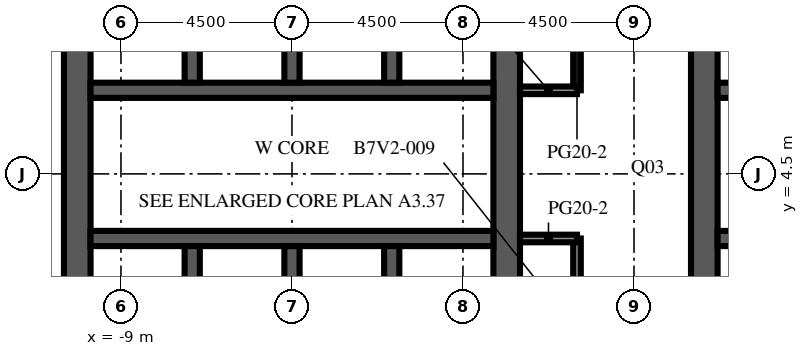
"""IFC4 building model, lengths in metres.
Left out: names, types, materials, properties, quantities, classifications, styles, units other than length and angle.
Written with IfcOpenShell. Run it as: python <this file> out.ifc"""

import sys

from ifc_helpers import new_model, si_unit, direction, frame, frame_2d, origin, place, context, subcontext, project, spatial, rectangle, extrude, element, fill, save


model = new_model("IFC4")
c1 = context("Model", 3, precision=1e-05, world=origin(), true_north=direction((0.0, 1.0)))
c2 = subcontext(c1, "Body", "Model", "MODEL_VIEW")
j1 = project(units=[si_unit("LENGTHUNIT", "METRE"), si_unit("PLANEANGLEUNIT", "RADIAN")], contexts=[c1])
p1 = place(None, origin())
s1 = spatial("IfcSite", under=j1, at=p1, CompositionType="ELEMENT")
p2 = place(p1, origin())
s2 = spatial("IfcBuilding", under=s1, at=p2, CompositionType="ELEMENT")
p3 = place(p2, frame((0.0, 0.0, 256.2)))
s3 = spatial("IfcBuildingStorey", under=s2, at=p3, CompositionType="ELEMENT", Elevation=256.2)
p4 = place(p3, frame((-10.15, -9.0, 0.0), z_axis=(0.0, 0.0, 1.0), x_axis=(0.0, 1.0, 0.0)))
e1 = element("IfcWall", 1, at=p4, inside=s3, PredefinedType="SHEAR", context=c2, shape_type="SweptSolid", body=[
    extrude(rectangle(XDim=27.5, YDim=0.7, at=frame_2d((13.75, 0.0))), origin(), (0.0, 0.0, 1.0), 4.1),
])
p5 = place(p4, frame((12.55, 0.0, 0.0)))
e2 = element("IfcOpeningElement", 2, at=p5, cuts=e1, PredefinedType="OPENING", context=c2, shape_type="SweptSolid", body=[
    extrude(rectangle(XDim=2.4, YDim=2.4, at=frame_2d((1.2, 1.2))), frame((0.0, 0.36, 0.0), z_axis=(0.0, -1.0, 0.0), x_axis=(1.0, 0.0, 0.0)), (0.0, 0.0, 1.0), 0.72),
])
p6 = place(p4, frame((6.825, 0.0, 0.0)))
e3 = element("IfcOpeningElement", 3, at=p6, cuts=e1, PredefinedType="OPENING", context=c2, shape_type="SweptSolid", body=[
    extrude(rectangle(XDim=1.2, YDim=2.1, at=frame_2d((0.6, 1.05))), frame((0.0, 0.36, 0.0), z_axis=(0.0, -1.0, 0.0), x_axis=(1.0, 0.0, 0.0)), (0.0, 0.0, 1.0), 0.72),
])
p7 = place(p4, frame((19.475, 0.0, 0.0)))
e4 = element("IfcOpeningElement", 4, at=p7, cuts=e1, PredefinedType="OPENING", context=c2, shape_type="SweptSolid", body=[
    extrude(rectangle(XDim=1.2, YDim=2.1, at=frame_2d((0.6, 1.05))), frame((0.0, 0.36, 0.0), z_axis=(0.0, -1.0, 0.0), x_axis=(1.0, 0.0, 0.0)), (0.0, 0.0, 1.0), 0.72),
])
p8 = place(p3, frame((1.15, -9.0, 0.0), z_axis=(0.0, 0.0, 1.0), x_axis=(0.0, 1.0, 0.0)))
e5 = element("IfcWall", 5, at=p8, inside=s3, PredefinedType="SHEAR", context=c2, shape_type="SweptSolid", body=[
    extrude(rectangle(XDim=27.5, YDim=0.7, at=frame_2d((13.75, 0.0))), origin(), (0.0, 0.0, 1.0), 4.1),
])
p9 = place(p8, frame((12.55, 0.0, 0.0)))
e6 = element("IfcOpeningElement", 6, at=p9, cuts=e5, PredefinedType="OPENING", context=c2, shape_type="SweptSolid", body=[
    extrude(rectangle(XDim=2.4, YDim=2.4, at=frame_2d((1.2, 1.2))), frame((0.0, 0.36, 0.0), z_axis=(0.0, -1.0, 0.0), x_axis=(1.0, 0.0, 0.0)), (0.0, 0.0, 1.0), 0.72),
])
p10 = place(p8, frame((3.788, 0.0, 0.0)))
e7 = element("IfcOpeningElement", 7, at=p10, cuts=e5, PredefinedType="OPENING", context=c2, shape_type="SweptSolid", body=[
    extrude(rectangle(XDim=0.968, YDim=2.1, at=frame_2d((0.484, 1.05))), frame((0.0, 0.36, 0.0), z_axis=(0.0, -1.0, 0.0), x_axis=(1.0, 0.0, 0.0)), (0.0, 0.0, 1.0), 0.72),
])
p11 = place(p8, frame((23.54, 0.0, 0.0)))
e8 = element("IfcOpeningElement", 8, at=p11, cuts=e5, PredefinedType="OPENING", context=c2, shape_type="SweptSolid", body=[
    extrude(rectangle(XDim=1.2, YDim=2.1, at=frame_2d((0.6, 1.05))), frame((0.0, 0.36, 0.0), z_axis=(0.0, -1.0, 0.0), x_axis=(1.0, 0.0, 0.0)), (0.0, 0.0, 1.0), 0.72),
])
p12 = place(p3, frame((-9.8, 2.8, 0.0), z_axis=(0.0, 0.0, 1.0), x_axis=(1.0, 0.0, 0.0)))
e9 = element("IfcWall", 9, at=p12, inside=s3, PredefinedType="SHEAR", context=c2, shape_type="SweptSolid", body=[
    extrude(rectangle(XDim=10.6, YDim=0.4, at=frame_2d((5.3, 0.0))), origin(), (0.0, 0.0, 1.0), 4.1),
])
p13 = place(p12, frame((0.688, 0.0, 0.0)))
e10 = element("IfcOpeningElement", 10, at=p13, cuts=e9, PredefinedType="OPENING", context=c2, shape_type="SweptSolid", body=[
    extrude(rectangle(XDim=1.1, YDim=2.1, at=frame_2d((0.55, 1.05))), frame((0.0, 0.21, 0.0), z_axis=(0.0, -1.0, 0.0), x_axis=(1.0, 0.0, 0.0)), (0.0, 0.0, 1.0), 0.42),
])
p14 = place(p12, frame((3.438, 0.0, 0.0)))
e11 = element("IfcOpeningElement", 11, at=p14, cuts=e9, PredefinedType="OPENING", context=c2, shape_type="SweptSolid", body=[
    extrude(rectangle(XDim=1.1, YDim=2.1, at=frame_2d((0.55, 1.05))), frame((0.0, 0.21, 0.0), z_axis=(0.0, -1.0, 0.0), x_axis=(1.0, 0.0, 0.0)), (0.0, 0.0, 1.0), 0.42),
])
p15 = place(p12, frame((6.113, 0.0, 0.0)))
e12 = element("IfcOpeningElement", 12, at=p15, cuts=e9, PredefinedType="OPENING", context=c2, shape_type="SweptSolid", body=[
    extrude(rectangle(XDim=1.0, YDim=2.1, at=frame_2d((0.5, 1.05))), frame((0.0, 0.21, 0.0), z_axis=(0.0, -1.0, 0.0), x_axis=(1.0, 0.0, 0.0)), (0.0, 0.0, 1.0), 0.42),
])
p16 = place(p12, frame((8.863, 0.0, 0.0)))
e13 = element("IfcOpeningElement", 13, at=p16, cuts=e9, PredefinedType="OPENING", context=c2, shape_type="SweptSolid", body=[
    extrude(rectangle(XDim=1.0, YDim=2.1, at=frame_2d((0.5, 1.05))), frame((0.0, 0.21, 0.0), z_axis=(0.0, -1.0, 0.0), x_axis=(1.0, 0.0, 0.0)), (0.0, 0.0, 1.0), 0.42),
])
p17 = place(p3, frame((-9.8, 6.7, 0.0), z_axis=(0.0, 0.0, 1.0), x_axis=(1.0, 0.0, 0.0)))
e14 = element("IfcWall", 14, at=p17, inside=s3, PredefinedType="SHEAR", context=c2, shape_type="SweptSolid", body=[
    extrude(rectangle(XDim=10.6, YDim=0.4, at=frame_2d((5.3, 0.0))), origin(), (0.0, 0.0, 1.0), 4.1),
])
p18 = place(p17, frame((3.438, 0.0, 0.0)))
e15 = element("IfcOpeningElement", 15, at=p18, cuts=e14, PredefinedType="OPENING", context=c2, shape_type="SweptSolid", body=[
    extrude(rectangle(XDim=1.1, YDim=2.1, at=frame_2d((0.55, 1.05))), frame((0.0, 0.21, 0.0), z_axis=(0.0, -1.0, 0.0), x_axis=(1.0, 0.0, 0.0)), (0.0, 0.0, 1.0), 0.42),
])
p19 = place(p17, frame((6.062, 0.0, 0.0)))
e16 = element("IfcOpeningElement", 16, at=p19, cuts=e14, PredefinedType="OPENING", context=c2, shape_type="SweptSolid", body=[
    extrude(rectangle(XDim=1.1, YDim=2.1, at=frame_2d((0.55, 1.05))), frame((0.0, 0.21, 0.0), z_axis=(0.0, -1.0, 0.0), x_axis=(1.0, 0.0, 0.0)), (0.0, 0.0, 1.0), 0.42),
])
p20 = place(p17, frame((8.812, 0.0, 0.0)))
e17 = element("IfcOpeningElement", 17, at=p20, cuts=e14, PredefinedType="OPENING", context=c2, shape_type="SweptSolid", body=[
    extrude(rectangle(XDim=1.1, YDim=2.1, at=frame_2d((0.55, 1.05))), frame((0.0, 0.21, 0.0), z_axis=(0.0, -1.0, 0.0), x_axis=(1.0, 0.0, 0.0)), (0.0, 0.0, 1.0), 0.42),
])
p21 = place(p17, frame((0.738, 0.0, 0.0)))
e18 = element("IfcOpeningElement", 18, at=p21, cuts=e14, PredefinedType="OPENING", context=c2, shape_type="SweptSolid", body=[
    extrude(rectangle(XDim=1.0, YDim=2.1, at=frame_2d((0.5, 1.05))), frame((0.0, 0.21, 0.0), z_axis=(0.0, -1.0, 0.0), x_axis=(1.0, 0.0, 0.0)), (0.0, 0.0, 1.0), 0.42),
])
for number, where, z_axis, x_axis in (
    (19, (-7.125, -0.3, 0.0), (0.0, 0.0, 1.0), (0.0, 1.0, 0.0)),
    (20, (-7.125, 6.9, 0.0), (0.0, 0.0, 1.0), (0.0, 1.0, 0.0)),
    (21, (-4.5, -0.3, 0.0), (0.0, 0.0, 1.0), (0.0, 1.0, 0.0)),
    (22, (-4.5, 6.9, 0.0), (0.0, 0.0, 1.0), (0.0, 1.0, 0.0)),
    (23, (-1.875, -0.3, 0.0), (0.0, 0.0, 1.0), (0.0, 1.0, 0.0)),
    (24, (-1.875, 6.9, 0.0), (0.0, 0.0, 1.0), (0.0, 1.0, 0.0)),
):
    element("IfcWall", number, at=place(p3, frame(where, z_axis=z_axis, x_axis=x_axis)), inside=s3, PredefinedType="SHEAR", context=c2, shape_type="SweptSolid", body=[
        extrude(rectangle(XDim=2.9, YDim=0.4, at=frame_2d((1.45, 0.0))), origin(), (0.0, 0.0, 1.0), 4.1),
    ])
p22 = place(p3, frame((6.35, -9.0, 0.0), z_axis=(0.0, 0.0, 1.0), x_axis=(0.0, 1.0, 0.0)))
e25 = element("IfcWall", 25, at=p22, inside=s3, PredefinedType="SHEAR", context=c2, shape_type="SweptSolid", body=[
    extrude(rectangle(XDim=27.5, YDim=0.7, at=frame_2d((13.75, 0.0))), origin(), (0.0, 0.0, 1.0), 4.1),
])
p23 = place(p22, frame((12.55, 0.0, 0.0)))
e26 = element("IfcOpeningElement", 26, at=p23, cuts=e25, PredefinedType="OPENING", context=c2, shape_type="SweptSolid", body=[
    extrude(rectangle(XDim=2.4, YDim=2.4, at=frame_2d((1.2, 1.2))), frame((0.0, 0.36, 0.0), z_axis=(0.0, -1.0, 0.0), x_axis=(1.0, 0.0, 0.0)), (0.0, 0.0, 1.0), 0.72),
])
p24 = place(p22, frame((3.788, 0.0, 0.0)))
e27 = element("IfcOpeningElement", 27, at=p24, cuts=e25, PredefinedType="OPENING", context=c2, shape_type="SweptSolid", body=[
    extrude(rectangle(XDim=0.968, YDim=2.1, at=frame_2d((0.484, 1.05))), frame((0.0, 0.36, 0.0), z_axis=(0.0, -1.0, 0.0), x_axis=(1.0, 0.0, 0.0)), (0.0, 0.0, 1.0), 0.72),
])
p25 = place(p22, frame((23.54, 0.0, 0.0)))
e28 = element("IfcOpeningElement", 28, at=p25, cuts=e25, PredefinedType="OPENING", context=c2, shape_type="SweptSolid", body=[
    extrude(rectangle(XDim=1.2, YDim=2.1, at=frame_2d((0.6, 1.05))), frame((0.0, 0.36, 0.0), z_axis=(0.0, -1.0, 0.0), x_axis=(1.0, 0.0, 0.0)), (0.0, 0.0, 1.0), 0.72),
])
p26 = place(p3, frame((6.7, 2.8, 0.0), z_axis=(0.0, 0.0, 1.0), x_axis=(1.0, 0.0, 0.0)))
e29 = element("IfcWall", 29, at=p26, inside=s3, PredefinedType="SHEAR", context=c2, shape_type="SweptSolid", body=[
    extrude(rectangle(XDim=10.6, YDim=0.4, at=frame_2d((5.3, 0.0))), origin(), (0.0, 0.0, 1.0), 4.1),
])
p27 = place(p26, frame((0.688, 0.0, 0.0)))
e30 = element("IfcOpeningElement", 30, at=p27, cuts=e29, PredefinedType="OPENING", context=c2, shape_type="SweptSolid", body=[
    extrude(rectangle(XDim=1.1, YDim=2.1, at=frame_2d((0.55, 1.05))), frame((0.0, 0.21, 0.0), z_axis=(0.0, -1.0, 0.0), x_axis=(1.0, 0.0, 0.0)), (0.0, 0.0, 1.0), 0.42),
])
p28 = place(p26, frame((3.438, 0.0, 0.0)))
e31 = element("IfcOpeningElement", 31, at=p28, cuts=e29, PredefinedType="OPENING", context=c2, shape_type="SweptSolid", body=[
    extrude(rectangle(XDim=1.1, YDim=2.1, at=frame_2d((0.55, 1.05))), frame((0.0, 0.21, 0.0), z_axis=(0.0, -1.0, 0.0), x_axis=(1.0, 0.0, 0.0)), (0.0, 0.0, 1.0), 0.42),
])
p29 = place(p26, frame((6.113, 0.0, 0.0)))
e32 = element("IfcOpeningElement", 32, at=p29, cuts=e29, PredefinedType="OPENING", context=c2, shape_type="SweptSolid", body=[
    extrude(rectangle(XDim=1.0, YDim=2.1, at=frame_2d((0.5, 1.05))), frame((0.0, 0.21, 0.0), z_axis=(0.0, -1.0, 0.0), x_axis=(1.0, 0.0, 0.0)), (0.0, 0.0, 1.0), 0.42),
])
p30 = place(p26, frame((8.863, 0.0, 0.0)))
e33 = element("IfcOpeningElement", 33, at=p30, cuts=e29, PredefinedType="OPENING", context=c2, shape_type="SweptSolid", body=[
    extrude(rectangle(XDim=1.0, YDim=2.1, at=frame_2d((0.5, 1.05))), frame((0.0, 0.21, 0.0), z_axis=(0.0, -1.0, 0.0), x_axis=(1.0, 0.0, 0.0)), (0.0, 0.0, 1.0), 0.42),
])
p31 = place(p3, frame((6.7, 6.7, 0.0), z_axis=(0.0, 0.0, 1.0), x_axis=(1.0, 0.0, 0.0)))
e34 = element("IfcWall", 34, at=p31, inside=s3, PredefinedType="SHEAR", context=c2, shape_type="SweptSolid", body=[
    extrude(rectangle(XDim=10.6, YDim=0.4, at=frame_2d((5.3, 0.0))), origin(), (0.0, 0.0, 1.0), 4.1),
])
p32 = place(p31, frame((3.438, 0.0, 0.0)))
e35 = element("IfcOpeningElement", 35, at=p32, cuts=e34, PredefinedType="OPENING", context=c2, shape_type="SweptSolid", body=[
    extrude(rectangle(XDim=1.1, YDim=2.1, at=frame_2d((0.55, 1.05))), frame((0.0, 0.21, 0.0), z_axis=(0.0, -1.0, 0.0), x_axis=(1.0, 0.0, 0.0)), (0.0, 0.0, 1.0), 0.42),
])
p33 = place(p31, frame((6.062, 0.0, 0.0)))
e36 = element("IfcOpeningElement", 36, at=p33, cuts=e34, PredefinedType="OPENING", context=c2, shape_type="SweptSolid", body=[
    extrude(rectangle(XDim=1.1, YDim=2.1, at=frame_2d((0.55, 1.05))), frame((0.0, 0.21, 0.0), z_axis=(0.0, -1.0, 0.0), x_axis=(1.0, 0.0, 0.0)), (0.0, 0.0, 1.0), 0.42),
])
p34 = place(p31, frame((8.812, 0.0, 0.0)))
e37 = element("IfcOpeningElement", 37, at=p34, cuts=e34, PredefinedType="OPENING", context=c2, shape_type="SweptSolid", body=[
    extrude(rectangle(XDim=1.1, YDim=2.1, at=frame_2d((0.55, 1.05))), frame((0.0, 0.21, 0.0), z_axis=(0.0, -1.0, 0.0), x_axis=(1.0, 0.0, 0.0)), (0.0, 0.0, 1.0), 0.42),
])
p35 = place(p31, frame((0.738, 0.0, 0.0)))
e38 = element("IfcOpeningElement", 38, at=p35, cuts=e34, PredefinedType="OPENING", context=c2, shape_type="SweptSolid", body=[
    extrude(rectangle(XDim=1.0, YDim=2.1, at=frame_2d((0.5, 1.05))), frame((0.0, 0.21, 0.0), z_axis=(0.0, -1.0, 0.0), x_axis=(1.0, 0.0, 0.0)), (0.0, 0.0, 1.0), 0.42),
])
p36 = place(p3, frame((3.0, -3.5, 0.0), z_axis=(0.0, 0.0, 1.0), x_axis=(0.0, 1.0, 0.0)))
e39 = element("IfcWall", 39, at=p36, inside=s3, PredefinedType="PARTITIONING", context=c2, shape_type="SweptSolid", body=[
    extrude(rectangle(XDim=6.3, YDim=0.2, at=frame_2d((3.15, 0.0))), origin(), (0.0, 0.0, 1.0), 3.5),
])
p37 = place(p36, frame((3.35, 0.0, 0.0)))
e40 = element("IfcOpeningElement", 40, at=p37, cuts=e39, PredefinedType="OPENING", context=c2, shape_type="SweptSolid", body=[
    extrude(rectangle(XDim=1.0, YDim=2.1, at=frame_2d((0.5, 1.05))), frame((0.0, 0.11, 0.0), z_axis=(0.0, -1.0, 0.0), x_axis=(1.0, 0.0, 0.0)), (0.0, 0.0, 1.0), 0.22),
])
p38 = place(p3, frame((3.0, 6.7, 0.0), z_axis=(0.0, 0.0, 1.0), x_axis=(0.0, 1.0, 0.0)))
e41 = element("IfcWall", 41, at=p38, inside=s3, PredefinedType="PARTITIONING", context=c2, shape_type="SweptSolid", body=[
    extrude(rectangle(XDim=11.8, YDim=0.2, at=frame_2d((5.9, 0.0))), origin(), (0.0, 0.0, 1.0), 3.5),
])
p39 = place(p38, frame((7.1, 0.0, 0.0)))
e42 = element("IfcOpeningElement", 42, at=p39, cuts=e41, PredefinedType="OPENING", context=c2, shape_type="SweptSolid", body=[
    extrude(rectangle(XDim=1.0, YDim=2.1, at=frame_2d((0.5, 1.05))), frame((0.0, 0.11, 0.0), z_axis=(0.0, -1.0, 0.0), x_axis=(1.0, 0.0, 0.0)), (0.0, 0.0, 1.0), 0.22),
])
for number, where, z_axis, x_axis in (
    (43, (1.5, 2.8, 0.0), (0.0, 0.0, 1.0), (1.0, 0.0, 0.0)),
    (44, (1.5, 6.7, 0.0), (0.0, 0.0, 1.0), (1.0, 0.0, 0.0)),
):
    element("IfcWall", number, at=place(p3, frame(where, z_axis=z_axis, x_axis=x_axis)), inside=s3, PredefinedType="PARTITIONING", context=c2, shape_type="SweptSolid", body=[
        extrude(rectangle(XDim=1.5, YDim=0.2, at=frame_2d((0.75, 0.0))), origin(), (0.0, 0.0, 1.0), 3.5),
    ])
p40 = place(p13, origin())
e45 = element("IfcDoor", 45, at=p40, inside=s3, OperationType="DOUBLE_DOOR_SLIDING", PredefinedType="DOOR", context=c2, shape_type="SweptSolid", body=[
    extrude(rectangle(XDim=1.1, YDim=2.1, at=frame_2d((0.55, 1.05))), frame((0.0, 0.025, 0.0), z_axis=(0.0, -1.0, 0.0), x_axis=(1.0, 0.0, 0.0)), (0.0, 0.0, 1.0), 0.05),
])
fill(e10, e45)
p41 = place(p14, origin())
e46 = element("IfcDoor", 46, at=p41, inside=s3, OperationType="DOUBLE_DOOR_SLIDING", PredefinedType="DOOR", context=c2, shape_type="SweptSolid", body=[
    extrude(rectangle(XDim=1.1, YDim=2.1, at=frame_2d((0.55, 1.05))), frame((0.0, 0.025, 0.0), z_axis=(0.0, -1.0, 0.0), x_axis=(1.0, 0.0, 0.0)), (0.0, 0.0, 1.0), 0.05),
])
fill(e11, e46)
p42 = place(p18, origin())
e47 = element("IfcDoor", 47, at=p42, inside=s3, OperationType="DOUBLE_DOOR_SLIDING", PredefinedType="DOOR", context=c2, shape_type="SweptSolid", body=[
    extrude(rectangle(XDim=1.1, YDim=2.1, at=frame_2d((0.55, 1.05))), frame((0.0, 0.025, 0.0), z_axis=(0.0, -1.0, 0.0), x_axis=(1.0, 0.0, 0.0)), (0.0, 0.0, 1.0), 0.05),
])
fill(e15, e47)
p43 = place(p19, origin())
e48 = element("IfcDoor", 48, at=p43, inside=s3, OperationType="DOUBLE_DOOR_SLIDING", PredefinedType="DOOR", context=c2, shape_type="SweptSolid", body=[
    extrude(rectangle(XDim=1.1, YDim=2.1, at=frame_2d((0.55, 1.05))), frame((0.0, 0.025, 0.0), z_axis=(0.0, -1.0, 0.0), x_axis=(1.0, 0.0, 0.0)), (0.0, 0.0, 1.0), 0.05),
])
fill(e16, e48)
p44 = place(p20, origin())
e49 = element("IfcDoor", 49, at=p44, inside=s3, OperationType="DOUBLE_DOOR_SLIDING", PredefinedType="DOOR", context=c2, shape_type="SweptSolid", body=[
    extrude(rectangle(XDim=1.1, YDim=2.1, at=frame_2d((0.55, 1.05))), frame((0.0, 0.025, 0.0), z_axis=(0.0, -1.0, 0.0), x_axis=(1.0, 0.0, 0.0)), (0.0, 0.0, 1.0), 0.05),
])
fill(e17, e49)
p45 = place(p5, origin())
e50 = element("IfcDoor", 50, at=p45, inside=s3, OperationType="DOUBLE_DOOR_DOUBLE_SWING", PredefinedType="DOOR", context=c2, shape_type="SweptSolid", body=[
    extrude(rectangle(XDim=2.4, YDim=2.4, at=frame_2d((1.2, 1.2))), frame((0.0, 0.025, 0.0), z_axis=(0.0, -1.0, 0.0), x_axis=(1.0, 0.0, 0.0)), (0.0, 0.0, 1.0), 0.05),
])
fill(e2, e50)
p46 = place(p9, origin())
e51 = element("IfcDoor", 51, at=p46, inside=s3, OperationType="DOUBLE_DOOR_DOUBLE_SWING", PredefinedType="DOOR", context=c2, shape_type="SweptSolid", body=[
    extrude(rectangle(XDim=2.4, YDim=2.4, at=frame_2d((1.2, 1.2))), frame((0.0, 0.025, 0.0), z_axis=(0.0, -1.0, 0.0), x_axis=(1.0, 0.0, 0.0)), (0.0, 0.0, 1.0), 0.05),
])
fill(e6, e51)
p47 = place(p23, origin())
e52 = element("IfcDoor", 52, at=p47, inside=s3, OperationType="DOUBLE_DOOR_DOUBLE_SWING", PredefinedType="DOOR", context=c2, shape_type="SweptSolid", body=[
    extrude(rectangle(XDim=2.4, YDim=2.4, at=frame_2d((1.2, 1.2))), frame((0.0, 0.025, 0.0), z_axis=(0.0, -1.0, 0.0), x_axis=(1.0, 0.0, 0.0)), (0.0, 0.0, 1.0), 0.05),
])
fill(e26, e52)
p48 = place(p15, origin())
e53 = element("IfcDoor", 53, at=p48, inside=s3, OperationType="SINGLE_SWING_LEFT", PredefinedType="DOOR", context=c2, shape_type="SweptSolid", body=[
    extrude(rectangle(XDim=1.0, YDim=2.1, at=frame_2d((0.5, 1.05))), frame((0.0, 0.025, 0.0), z_axis=(0.0, -1.0, 0.0), x_axis=(1.0, 0.0, 0.0)), (0.0, 0.0, 1.0), 0.05),
])
fill(e12, e53)
p49 = place(p16, origin())
e54 = element("IfcDoor", 54, at=p49, inside=s3, OperationType="SINGLE_SWING_RIGHT", PredefinedType="DOOR", context=c2, shape_type="SweptSolid", body=[
    extrude(rectangle(XDim=1.0, YDim=2.1, at=frame_2d((0.5, 1.05))), frame((0.0, 0.025, 0.0), z_axis=(0.0, -1.0, 0.0), x_axis=(1.0, 0.0, 0.0)), (0.0, 0.0, 1.0), 0.05),
])
fill(e13, e54)
p50 = place(p21, origin())
e55 = element("IfcDoor", 55, at=p50, inside=s3, OperationType="SINGLE_SWING_LEFT", PredefinedType="DOOR", context=c2, shape_type="SweptSolid", body=[
    extrude(rectangle(XDim=1.0, YDim=2.1, at=frame_2d((0.5, 1.05))), frame((0.0, 0.025, 0.0), z_axis=(0.0, -1.0, 0.0), x_axis=(1.0, 0.0, 0.0)), (0.0, 0.0, 1.0), 0.05),
])
fill(e18, e55)
save(model, sys.argv[1])
